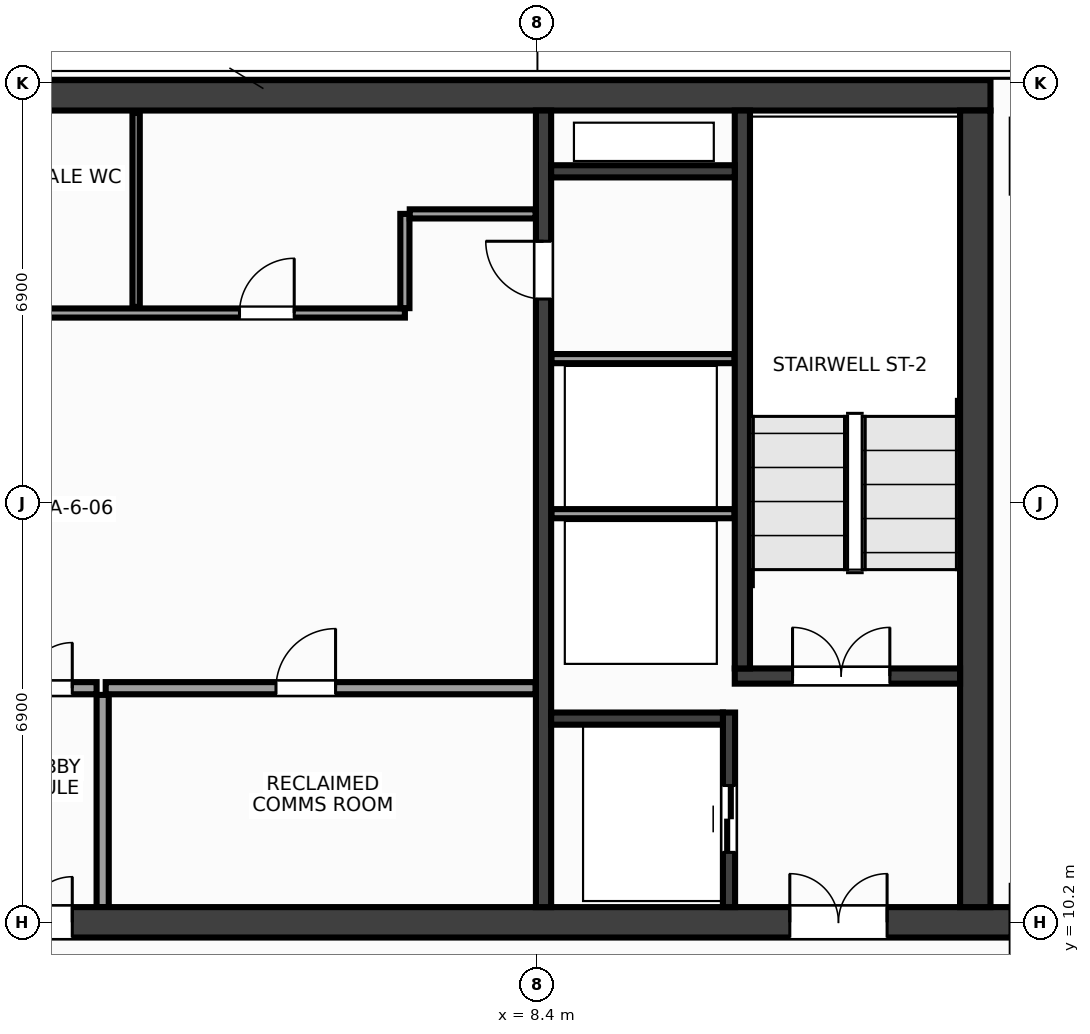
"""IFC4 building model, lengths in metres.
Left out: names, types, materials, properties, quantities, classifications, styles, units other than length and angle.
Written with IfcOpenShell. Run it as: python <this file> out.ifc"""

import sys

from ifc_helpers import new_model, si_unit, direction, frame, frame_2d, origin, place, context, subcontext, project, spatial, rectangle, extrude, source, transform, mapped, element, fill, save


model = new_model("IFC4")
c1 = context("Model", 3, precision=1e-05, world=origin(), true_north=direction((0.0, 1.0)))
c2 = subcontext(c1, "Body", "Model", "MODEL_VIEW")
j1 = project(units=[si_unit("LENGTHUNIT", "METRE"), si_unit("PLANEANGLEUNIT", "RADIAN")], contexts=[c1])
p1 = place(None, origin())
s1 = spatial("IfcSite", under=j1, at=p1, CompositionType="ELEMENT")
p2 = place(p1, origin())
s2 = spatial("IfcBuilding", under=s1, at=p2, CompositionType="ELEMENT")
p3 = place(p2, frame((0.0, 0.0, 275.6)))
s3 = spatial("IfcBuildingStorey", under=s2, at=p3, CompositionType="ELEMENT", Elevation=275.6)
m1 = source(origin(), c2, "Body", "SweptSolid", [
    extrude(rectangle(XDim=31.7, YDim=0.5, at=frame_2d((15.85, 0.0))), origin(), (0.0, 0.0, 1.0), 3.6),
])
p4 = place(p3, frame((-15.85, 23.8, 0.0), z_axis=(0.0, 0.0, 1.0), x_axis=(1.0, 0.0, 0.0)))
e1 = element("IfcWall", 1, at=p4, inside=s3, PredefinedType="SHEAR", context=c2, shape_type="MappedRepresentation", body=[
    mapped(m1, transform((0.0, 0.0, 0.0), x_axis=(1.0, 0.0, 0.0), y_axis=(0.0, 1.0, 0.0), z_axis=(0.0, 0.0, 1.0), scale=1.0)),
])
m2 = source(origin(), c2, "Body", "SweptSolid", [
    extrude(rectangle(XDim=32.4, YDim=0.5, at=frame_2d((16.2, 0.0))), origin(), (0.0, 0.0, 1.0), 3.6),
])
p5 = place(p3, frame((-16.2, 10.2, 0.0), z_axis=(0.0, 0.0, 1.0), x_axis=(1.0, 0.0, 0.0)))
e2 = element("IfcWall", 2, at=p5, inside=s3, PredefinedType="SHEAR", context=c2, shape_type="MappedRepresentation", body=[
    mapped(m2, transform((0.0, 0.0, 0.0), x_axis=(1.0, 0.0, 0.0), y_axis=(0.0, 1.0, 0.0), z_axis=(0.0, 0.0, 1.0), scale=1.0)),
])
p6 = place(p5, frame((2.05, 0.0, 0.0)))
e3 = element("IfcOpeningElement", 3, at=p6, cuts=e2, PredefinedType="OPENING", context=c2, shape_type="SweptSolid", body=[
    extrude(rectangle(XDim=1.6, YDim=2.15, at=frame_2d((0.8, 1.075))), frame((0.0, 0.262, 0.0), z_axis=(0.0, -1.0, 0.0), x_axis=(1.0, 0.0, 0.0)), (0.0, 0.0, 1.0), 0.524),
])
p7 = place(p5, frame((28.75, 0.0, 0.0)))
e4 = element("IfcOpeningElement", 4, at=p7, cuts=e2, PredefinedType="OPENING", context=c2, shape_type="SweptSolid", body=[
    extrude(rectangle(XDim=1.6, YDim=2.15, at=frame_2d((0.8, 1.075))), frame((0.0, 0.262, 0.0), z_axis=(0.0, -1.0, 0.0), x_axis=(1.0, 0.0, 0.0)), (0.0, 0.0, 1.0), 0.524),
])
p8 = place(p5, frame((15.45, 0.0, 0.0)))
e5 = element("IfcOpeningElement", 5, at=p8, cuts=e2, PredefinedType="OPENING", context=c2, shape_type="SweptSolid", body=[
    extrude(rectangle(XDim=1.5, YDim=2.2, at=frame_2d((0.75, 1.1))), frame((0.0, 0.262, 0.0), z_axis=(0.0, -1.0, 0.0), x_axis=(1.0, 0.0, 0.0)), (0.0, 0.0, 1.0), 0.524),
])
m3 = source(origin(), c2, "Body", "SweptSolid", [
    extrude(rectangle(XDim=13.1, YDim=0.5, at=frame_2d((6.55, 0.0))), origin(), (0.0, 0.0, 1.0), 3.6),
])
p9 = place(p3, frame((15.6, 10.45, 0.0), z_axis=(0.0, 0.0, 1.0), x_axis=(0.0, 1.0, 0.0)))
e6 = element("IfcWall", 6, at=p9, inside=s3, PredefinedType="SHEAR", context=c2, shape_type="MappedRepresentation", body=[
    mapped(m3, transform((0.0, 0.0, 0.0), x_axis=(1.0, 0.0, 0.0), y_axis=(0.0, 1.0, 0.0), z_axis=(0.0, 0.0, 1.0), scale=1.0)),
])
m4 = source(origin(), c2, "Body", "SweptSolid", [
    extrude(rectangle(XDim=13.1, YDim=0.25, at=frame_2d((6.55, 0.0))), origin(), (0.0, 0.0, 1.0), 3.6),
])
p10 = place(p3, frame((8.5, 10.45, 0.0), z_axis=(0.0, 0.0, 1.0), x_axis=(0.0, 1.0, 0.0)))
e7 = element("IfcWall", 7, at=p10, inside=s3, PredefinedType="SHEAR", context=c2, shape_type="MappedRepresentation", body=[
    mapped(m4, transform((0.0, 0.0, 0.0), x_axis=(1.0, 0.0, 0.0), y_axis=(0.0, 1.0, 0.0), z_axis=(0.0, 0.0, 1.0), scale=1.0)),
])
p11 = place(p10, frame((10.0, 0.0, 0.0)))
e8 = element("IfcOpeningElement", 8, at=p11, cuts=e7, PredefinedType="OPENING", context=c2, shape_type="SweptSolid", body=[
    extrude(rectangle(XDim=0.95, YDim=2.15, at=frame_2d((0.475, 1.075))), frame((0.0, 0.137, 0.0), z_axis=(0.0, -1.0, 0.0), x_axis=(1.0, 0.0, 0.0)), (0.0, 0.0, 1.0), 0.274),
])
m5 = source(origin(), c2, "Body", "SweptSolid", [
    extrude(rectangle(XDim=3.705, YDim=0.25, at=frame_2d((1.853, 0.0))), origin(), (0.0, 0.0, 1.0), 3.6),
])
p12 = place(p3, frame((11.645, 14.25, 0.0), z_axis=(0.0, 0.0, 1.0), x_axis=(1.0, 0.0, 0.0)))
e9 = element("IfcWall", 9, at=p12, inside=s3, PredefinedType="SHEAR", context=c2, shape_type="MappedRepresentation", body=[
    mapped(m5, transform((0.0, 0.0, 0.0), x_axis=(1.0, 0.0, 0.0), y_axis=(0.0, 1.0, 0.0), z_axis=(0.0, 0.0, 1.0), scale=1.0)),
])
p13 = place(p12, frame((0.95, 0.0, 0.0)))
e10 = element("IfcOpeningElement", 10, at=p13, cuts=e9, PredefinedType="OPENING", context=c2, shape_type="SweptSolid", body=[
    extrude(rectangle(XDim=1.6, YDim=2.15, at=frame_2d((0.8, 1.075))), frame((0.0, 0.137, 0.0), z_axis=(0.0, -1.0, 0.0), x_axis=(1.0, 0.0, 0.0)), (0.0, 0.0, 1.0), 0.274),
])
m6 = source(origin(), c2, "Body", "SweptSolid", [
    extrude(rectangle(XDim=9.175, YDim=0.25, at=frame_2d((4.587, 0.0))), origin(), (0.0, 0.0, 1.0), 3.6),
])
p14 = place(p3, frame((11.77, 14.375, 0.0), z_axis=(0.0, 0.0, 1.0), x_axis=(0.0, 1.0, 0.0)))
e11 = element("IfcWall", 11, at=p14, inside=s3, PredefinedType="SHEAR", context=c2, shape_type="MappedRepresentation", body=[
    mapped(m6, transform((0.0, 0.0, 0.0), x_axis=(1.0, 0.0, 0.0), y_axis=(0.0, 1.0, 0.0), z_axis=(0.0, 0.0, 1.0), scale=1.0)),
])
m7 = source(origin(), c2, "Body", "SweptSolid", [
    extrude(rectangle(XDim=3.2, YDim=0.2, at=frame_2d((1.6, 0.0))), origin(), (0.0, 0.0, 1.0), 3.6),
])
p15 = place(p3, frame((11.55, 10.45, 0.0), z_axis=(0.0, 0.0, 1.0), x_axis=(0.0, 1.0, 0.0)))
e12 = element("IfcWall", 12, at=p15, inside=s3, PredefinedType="SHEAR", context=c2, shape_type="MappedRepresentation", body=[
    mapped(m7, transform((0.0, 0.0, 0.0), x_axis=(1.0, 0.0, 0.0), y_axis=(0.0, 1.0, 0.0), z_axis=(0.0, 0.0, 1.0), scale=1.0)),
])
p16 = place(p15, frame((0.9, 0.0, 0.0)))
e13 = element("IfcOpeningElement", 13, at=p16, cuts=e12, PredefinedType="OPENING", context=c2, shape_type="SweptSolid", body=[
    extrude(rectangle(XDim=1.1, YDim=2.15, at=frame_2d((0.55, 1.075))), frame((0.0, 0.112, 0.0), z_axis=(0.0, -1.0, 0.0), x_axis=(1.0, 0.0, 0.0)), (0.0, 0.0, 1.0), 0.224),
])
m8 = source(origin(), c2, "Body", "SweptSolid", [
    extrude(rectangle(XDim=2.825, YDim=0.2, at=frame_2d((1.413, 0.0))), origin(), (0.0, 0.0, 1.0), 3.6),
])
p17 = place(p3, frame((8.625, 13.55, 0.0), z_axis=(0.0, 0.0, 1.0), x_axis=(1.0, 0.0, 0.0)))
e14 = element("IfcWall", 14, at=p17, inside=s3, PredefinedType="SHEAR", context=c2, shape_type="MappedRepresentation", body=[
    mapped(m8, transform((0.0, 0.0, 0.0), x_axis=(1.0, 0.0, 0.0), y_axis=(0.0, 1.0, 0.0), z_axis=(0.0, 0.0, 1.0), scale=1.0)),
])
m9 = source(origin(), c2, "Body", "SweptSolid", [
    extrude(rectangle(XDim=3.02, YDim=0.2, at=frame_2d((1.51, 0.0))), origin(), (0.0, 0.0, 1.0), 3.6),
])
p18 = place(p3, frame((8.625, 22.55, 0.0), z_axis=(0.0, 0.0, 1.0), x_axis=(1.0, 0.0, 0.0)))
e15 = element("IfcWall", 15, at=p18, inside=s3, PredefinedType="SHEAR", context=c2, shape_type="MappedRepresentation", body=[
    mapped(m9, transform((0.0, 0.0, 0.0), x_axis=(1.0, 0.0, 0.0), y_axis=(0.0, 1.0, 0.0), z_axis=(0.0, 0.0, 1.0), scale=1.0)),
])
m10 = source(origin(), c2, "Body", "SweptSolid", [
    extrude(rectangle(XDim=3.01, YDim=0.15, at=frame_2d((1.505, 0.0))), origin(), (0.0, 0.0, 1.0), 3.37),
])
for number, where, z_axis, x_axis in (
    (16, (8.63, 16.92, 0.0), (0.0, 0.0, 1.0), (1.0, 0.0, 0.0)),
    (17, (8.63, 19.47, 0.0), (0.0, 0.0, 1.0), (1.0, 0.0, 0.0)),
):
    element("IfcWall", number, at=place(p3, frame(where, z_axis=z_axis, x_axis=x_axis)), inside=s3, PredefinedType="PARTITIONING", context=c2, shape_type="MappedRepresentation", body=[
        mapped(m10, transform((0.0, 0.0, 0.0), x_axis=(1.0, 0.0, 0.0), y_axis=(0.0, 1.0, 0.0), z_axis=(0.0, 0.0, 1.0), scale=1.0)),
    ])
m11 = source(origin(), c2, "Body", "SweptSolid", [
    extrude(rectangle(XDim=7.07, YDim=0.2, at=frame_2d((3.535, 0.0))), origin(), (0.0, 0.0, 1.0), 3.37),
])
p19 = place(p3, frame((1.3, 14.05, 0.0), z_axis=(0.0, 0.0, 1.0), x_axis=(1.0, 0.0, 0.0)))
e18 = element("IfcWall", 18, at=p19, inside=s3, PredefinedType="PARTITIONING", context=c2, shape_type="MappedRepresentation", body=[
    mapped(m11, transform((0.0, 0.0, 0.0), x_axis=(1.0, 0.0, 0.0), y_axis=(0.0, 1.0, 0.0), z_axis=(0.0, 0.0, 1.0), scale=1.0)),
])
p20 = place(p19, frame((2.8, 0.0, 0.0)))
e19 = element("IfcOpeningElement", 19, at=p20, cuts=e18, PredefinedType="OPENING", context=c2, shape_type="SweptSolid", body=[
    extrude(rectangle(XDim=0.98, YDim=2.15, at=frame_2d((0.49, 1.075))), frame((0.0, 0.112, 0.0), z_axis=(0.0, -1.0, 0.0), x_axis=(1.0, 0.0, 0.0)), (0.0, 0.0, 1.0), 0.224),
])
m12 = source(origin(), c2, "Body", "SweptSolid", [
    extrude(rectangle(XDim=3.49, YDim=0.2, at=frame_2d((1.745, 0.0))), origin(), (0.0, 0.0, 1.0), 3.37),
])
p21 = place(p3, frame((1.25, 10.45, 0.0), z_axis=(0.0, 0.0, 1.0), x_axis=(0.0, 1.0, 0.0)))
e20 = element("IfcWall", 20, at=p21, inside=s3, PredefinedType="PARTITIONING", context=c2, shape_type="MappedRepresentation", body=[
    mapped(m12, transform((0.0, 0.0, 0.0), x_axis=(1.0, 0.0, 0.0), y_axis=(0.0, 1.0, 0.0), z_axis=(0.0, 0.0, 1.0), scale=1.0)),
])
m13 = source(origin(), c2, "Body", "SweptSolid", [
    extrude(rectangle(XDim=2.3, YDim=0.2, at=frame_2d((1.15, 0.0))), origin(), (0.0, 0.0, 1.0), 3.37),
])
p22 = place(p3, frame((-1.15, 14.05, 0.0), z_axis=(0.0, 0.0, 1.0), x_axis=(1.0, 0.0, 0.0)))
e21 = element("IfcWall", 21, at=p22, inside=s3, PredefinedType="PARTITIONING", context=c2, shape_type="MappedRepresentation", body=[
    mapped(m13, transform((0.0, 0.0, 0.0), x_axis=(1.0, 0.0, 0.0), y_axis=(0.0, 1.0, 0.0), z_axis=(0.0, 0.0, 1.0), scale=1.0)),
])
p23 = place(p22, frame((0.4, 0.0, 0.0)))
e22 = element("IfcOpeningElement", 22, at=p23, cuts=e21, PredefinedType="OPENING", context=c2, shape_type="SweptSolid", body=[
    extrude(rectangle(XDim=1.5, YDim=2.2, at=frame_2d((0.75, 1.1))), frame((0.0, 0.112, 0.0), z_axis=(0.0, -1.0, 0.0), x_axis=(1.0, 0.0, 0.0)), (0.0, 0.0, 1.0), 0.224),
])
m14 = source(origin(), c2, "Body", "SweptSolid", [
    extrude(rectangle(XDim=14.59, YDim=0.15, at=frame_2d((7.295, 0.0))), origin(), (0.0, 0.0, 1.0), 3.37),
])
p24 = place(p3, frame((-8.37, 20.22, 0.0), z_axis=(0.0, 0.0, 1.0), x_axis=(1.0, 0.0, 0.0)))
e23 = element("IfcWall", 23, at=p24, inside=s3, PredefinedType="PARTITIONING", context=c2, shape_type="MappedRepresentation", body=[
    mapped(m14, transform((0.0, 0.0, 0.0), x_axis=(1.0, 0.0, 0.0), y_axis=(0.0, 1.0, 0.0), z_axis=(0.0, 0.0, 1.0), scale=1.0)),
])
p25 = place(p24, frame((1.06, 0.0, 0.0)))
e24 = element("IfcOpeningElement", 24, at=p25, cuts=e23, PredefinedType="OPENING", context=c2, shape_type="SweptSolid", body=[
    extrude(rectangle(XDim=0.9, YDim=2.15, at=frame_2d((0.45, 1.075))), frame((0.0, 0.087, 0.0), z_axis=(0.0, -1.0, 0.0), x_axis=(1.0, 0.0, 0.0)), (0.0, 0.0, 1.0), 0.174),
])
p26 = place(p24, frame((4.22, 0.0, 0.0)))
e25 = element("IfcOpeningElement", 25, at=p26, cuts=e23, PredefinedType="OPENING", context=c2, shape_type="SweptSolid", body=[
    extrude(rectangle(XDim=0.9, YDim=2.15, at=frame_2d((0.45, 1.075))), frame((0.0, 0.087, 0.0), z_axis=(0.0, -1.0, 0.0), x_axis=(1.0, 0.0, 0.0)), (0.0, 0.0, 1.0), 0.174),
])
p27 = place(p24, frame((7.82, 0.0, 0.0)))
e26 = element("IfcOpeningElement", 26, at=p27, cuts=e23, PredefinedType="OPENING", context=c2, shape_type="SweptSolid", body=[
    extrude(rectangle(XDim=0.9, YDim=2.15, at=frame_2d((0.45, 1.075))), frame((0.0, 0.087, 0.0), z_axis=(0.0, -1.0, 0.0), x_axis=(1.0, 0.0, 0.0)), (0.0, 0.0, 1.0), 0.174),
])
p28 = place(p24, frame((11.87, 0.0, 0.0)))
e27 = element("IfcOpeningElement", 27, at=p28, cuts=e23, PredefinedType="OPENING", context=c2, shape_type="SweptSolid", body=[
    extrude(rectangle(XDim=0.9, YDim=2.15, at=frame_2d((0.45, 1.075))), frame((0.0, 0.087, 0.0), z_axis=(0.0, -1.0, 0.0), x_axis=(1.0, 0.0, 0.0)), (0.0, 0.0, 1.0), 0.174),
])
m15 = source(origin(), c2, "Body", "SweptSolid", [
    extrude(rectangle(XDim=1.55, YDim=0.15, at=frame_2d((0.775, 0.0))), origin(), (0.0, 0.0, 1.0), 3.37),
])
p29 = place(p3, frame((6.22, 20.3, 0.0), z_axis=(0.0, 0.0, 1.0), x_axis=(0.0, 1.0, 0.0)))
e28 = element("IfcWall", 28, at=p29, inside=s3, PredefinedType="PARTITIONING", context=c2, shape_type="MappedRepresentation", body=[
    mapped(m15, transform((0.0, 0.0, 0.0), x_axis=(1.0, 0.0, 0.0), y_axis=(0.0, 1.0, 0.0), z_axis=(0.0, 0.0, 1.0), scale=1.0)),
])
m16 = source(origin(), c2, "Body", "SweptSolid", [
    extrude(rectangle(XDim=2.07, YDim=0.15, at=frame_2d((1.035, 0.0))), origin(), (0.0, 0.0, 1.0), 3.37),
])
p30 = place(p3, frame((6.3, 21.85, 0.0), z_axis=(0.0, 0.0, 1.0), x_axis=(1.0, 0.0, 0.0)))
e29 = element("IfcWall", 29, at=p30, inside=s3, PredefinedType="PARTITIONING", context=c2, shape_type="MappedRepresentation", body=[
    mapped(m16, transform((0.0, 0.0, 0.0), x_axis=(1.0, 0.0, 0.0), y_axis=(0.0, 1.0, 0.0), z_axis=(0.0, 0.0, 1.0), scale=1.0)),
])
m17 = source(origin(), c2, "Body", "SweptSolid", [
    extrude(rectangle(XDim=3.19, YDim=0.12, at=frame_2d((1.595, 0.0))), origin(), (0.0, 0.0, 1.0), 3.37),
])
p31 = place(p3, frame((1.8, 20.32, 0.0), z_axis=(0.0, 0.0, 1.0), x_axis=(0.0, 1.0, 0.0)))
e30 = element("IfcWall", 30, at=p31, inside=s3, PredefinedType="PARTITIONING", context=c2, shape_type="MappedRepresentation", body=[
    mapped(m17, transform((0.0, 0.0, 0.0), x_axis=(1.0, 0.0, 0.0), y_axis=(0.0, 1.0, 0.0), z_axis=(0.0, 0.0, 1.0), scale=1.0)),
])
m18 = source(origin(), c2, "Body", "SweptSolid", [
    extrude(rectangle(XDim=1.6, YDim=2.15, at=frame_2d((0.8, 1.075))), frame((0.0, 0.025, 0.0), z_axis=(0.0, -1.0, 0.0), x_axis=(1.0, 0.0, 0.0)), (0.0, 0.0, 1.0), 0.05),
])
p32 = place(p13, origin())
e31 = element("IfcDoor", 31, at=p32, inside=s3, OperationType="DOUBLE_DOOR_SINGLE_SWING", PredefinedType="DOOR", context=c2, shape_type="MappedRepresentation", body=[
    mapped(m18, transform((0.0, 0.0, 0.0), x_axis=(1.0, 0.0, 0.0), y_axis=(0.0, 1.0, 0.0), z_axis=(0.0, 0.0, 1.0), scale=1.0)),
])
fill(e10, e31)
p33 = place(p7, origin())
e32 = element("IfcDoor", 32, at=p33, inside=s3, OperationType="DOUBLE_DOOR_SINGLE_SWING", PredefinedType="DOOR", context=c2, shape_type="MappedRepresentation", body=[
    mapped(m18, transform((0.0, 0.0, 0.0), x_axis=(1.0, 0.0, 0.0), y_axis=(0.0, 1.0, 0.0), z_axis=(0.0, 0.0, 1.0), scale=1.0)),
])
fill(e4, e32)
m19 = source(origin(), c2, "Body", "SweptSolid", [
    extrude(rectangle(XDim=1.1, YDim=2.15, at=frame_2d((0.55, 1.075))), frame((0.0, 0.025, 0.0), z_axis=(0.0, -1.0, 0.0), x_axis=(1.0, 0.0, 0.0)), (0.0, 0.0, 1.0), 0.05),
])
p34 = place(p16, origin())
e33 = element("IfcDoor", 33, at=p34, inside=s3, OperationType="DOUBLE_DOOR_SLIDING", PredefinedType="DOOR", context=c2, shape_type="MappedRepresentation", body=[
    mapped(m19, transform((0.0, 0.0, 0.0), x_axis=(1.0, 0.0, 0.0), y_axis=(0.0, 1.0, 0.0), z_axis=(0.0, 0.0, 1.0), scale=1.0)),
])
fill(e13, e33)
m20 = source(origin(), c2, "Body", "SweptSolid", [
    extrude(rectangle(XDim=0.95, YDim=2.15, at=frame_2d((0.475, 1.075))), frame((0.0, 0.025, 0.0), z_axis=(0.0, -1.0, 0.0), x_axis=(1.0, 0.0, 0.0)), (0.0, 0.0, 1.0), 0.05),
])
p35 = place(p11, origin())
e34 = element("IfcDoor", 34, at=p35, inside=s3, OperationType="SINGLE_SWING_RIGHT", PredefinedType="DOOR", context=c2, shape_type="MappedRepresentation", body=[
    mapped(m20, transform((0.0, 0.0, 0.0), x_axis=(1.0, 0.0, 0.0), y_axis=(0.0, 1.0, 0.0), z_axis=(0.0, 0.0, 1.0), scale=1.0)),
])
fill(e8, e34)
m21 = source(origin(), c2, "Body", "SweptSolid", [
    extrude(rectangle(XDim=0.98, YDim=2.15, at=frame_2d((0.49, 1.075))), frame((0.0, 0.025, 0.0), z_axis=(0.0, -1.0, 0.0), x_axis=(1.0, 0.0, 0.0)), (0.0, 0.0, 1.0), 0.05),
])
p36 = place(p20, origin())
e35 = element("IfcDoor", 35, at=p36, inside=s3, OperationType="SINGLE_SWING_RIGHT", PredefinedType="DOOR", context=c2, shape_type="MappedRepresentation", body=[
    mapped(m21, transform((0.0, 0.0, 0.0), x_axis=(1.0, 0.0, 0.0), y_axis=(0.0, 1.0, 0.0), z_axis=(0.0, 0.0, 1.0), scale=1.0)),
])
fill(e19, e35)
m22 = source(origin(), c2, "Body", "SweptSolid", [
    extrude(rectangle(XDim=1.5, YDim=2.2, at=frame_2d((0.75, 1.1))), frame((0.0, 0.025, 0.0), z_axis=(0.0, -1.0, 0.0), x_axis=(1.0, 0.0, 0.0)), (0.0, 0.0, 1.0), 0.05),
])
p37 = place(p23, origin())
e36 = element("IfcDoor", 36, at=p37, inside=s3, OperationType="DOUBLE_DOOR_SINGLE_SWING", PredefinedType="DOOR", context=c2, shape_type="MappedRepresentation", body=[
    mapped(m22, transform((0.0, 0.0, 0.0), x_axis=(1.0, 0.0, 0.0), y_axis=(0.0, 1.0, 0.0), z_axis=(0.0, 0.0, 1.0), scale=1.0)),
])
fill(e22, e36)
p38 = place(p8, origin())
e37 = element("IfcDoor", 37, at=p38, inside=s3, OperationType="DOUBLE_DOOR_SINGLE_SWING", PredefinedType="DOOR", context=c2, shape_type="MappedRepresentation", body=[
    mapped(m22, transform((0.0, 0.0, 0.0), x_axis=(1.0, 0.0, 0.0), y_axis=(0.0, 1.0, 0.0), z_axis=(0.0, 0.0, 1.0), scale=1.0)),
])
fill(e5, e37)
m23 = source(origin(), c2, "Body", "SweptSolid", [
    extrude(rectangle(XDim=0.9, YDim=2.15, at=frame_2d((0.45, 1.075))), frame((0.0, 0.025, 0.0), z_axis=(0.0, -1.0, 0.0), x_axis=(1.0, 0.0, 0.0)), (0.0, 0.0, 1.0), 0.05),
])
p39 = place(p28, origin())
e38 = element("IfcDoor", 38, at=p39, inside=s3, OperationType="SINGLE_SWING_RIGHT", PredefinedType="DOOR", context=c2, shape_type="MappedRepresentation", body=[
    mapped(m23, transform((0.0, 0.0, 0.0), x_axis=(1.0, 0.0, 0.0), y_axis=(0.0, 1.0, 0.0), z_axis=(0.0, 0.0, 1.0), scale=1.0)),
])
fill(e27, e38)
save(model, sys.argv[1])
